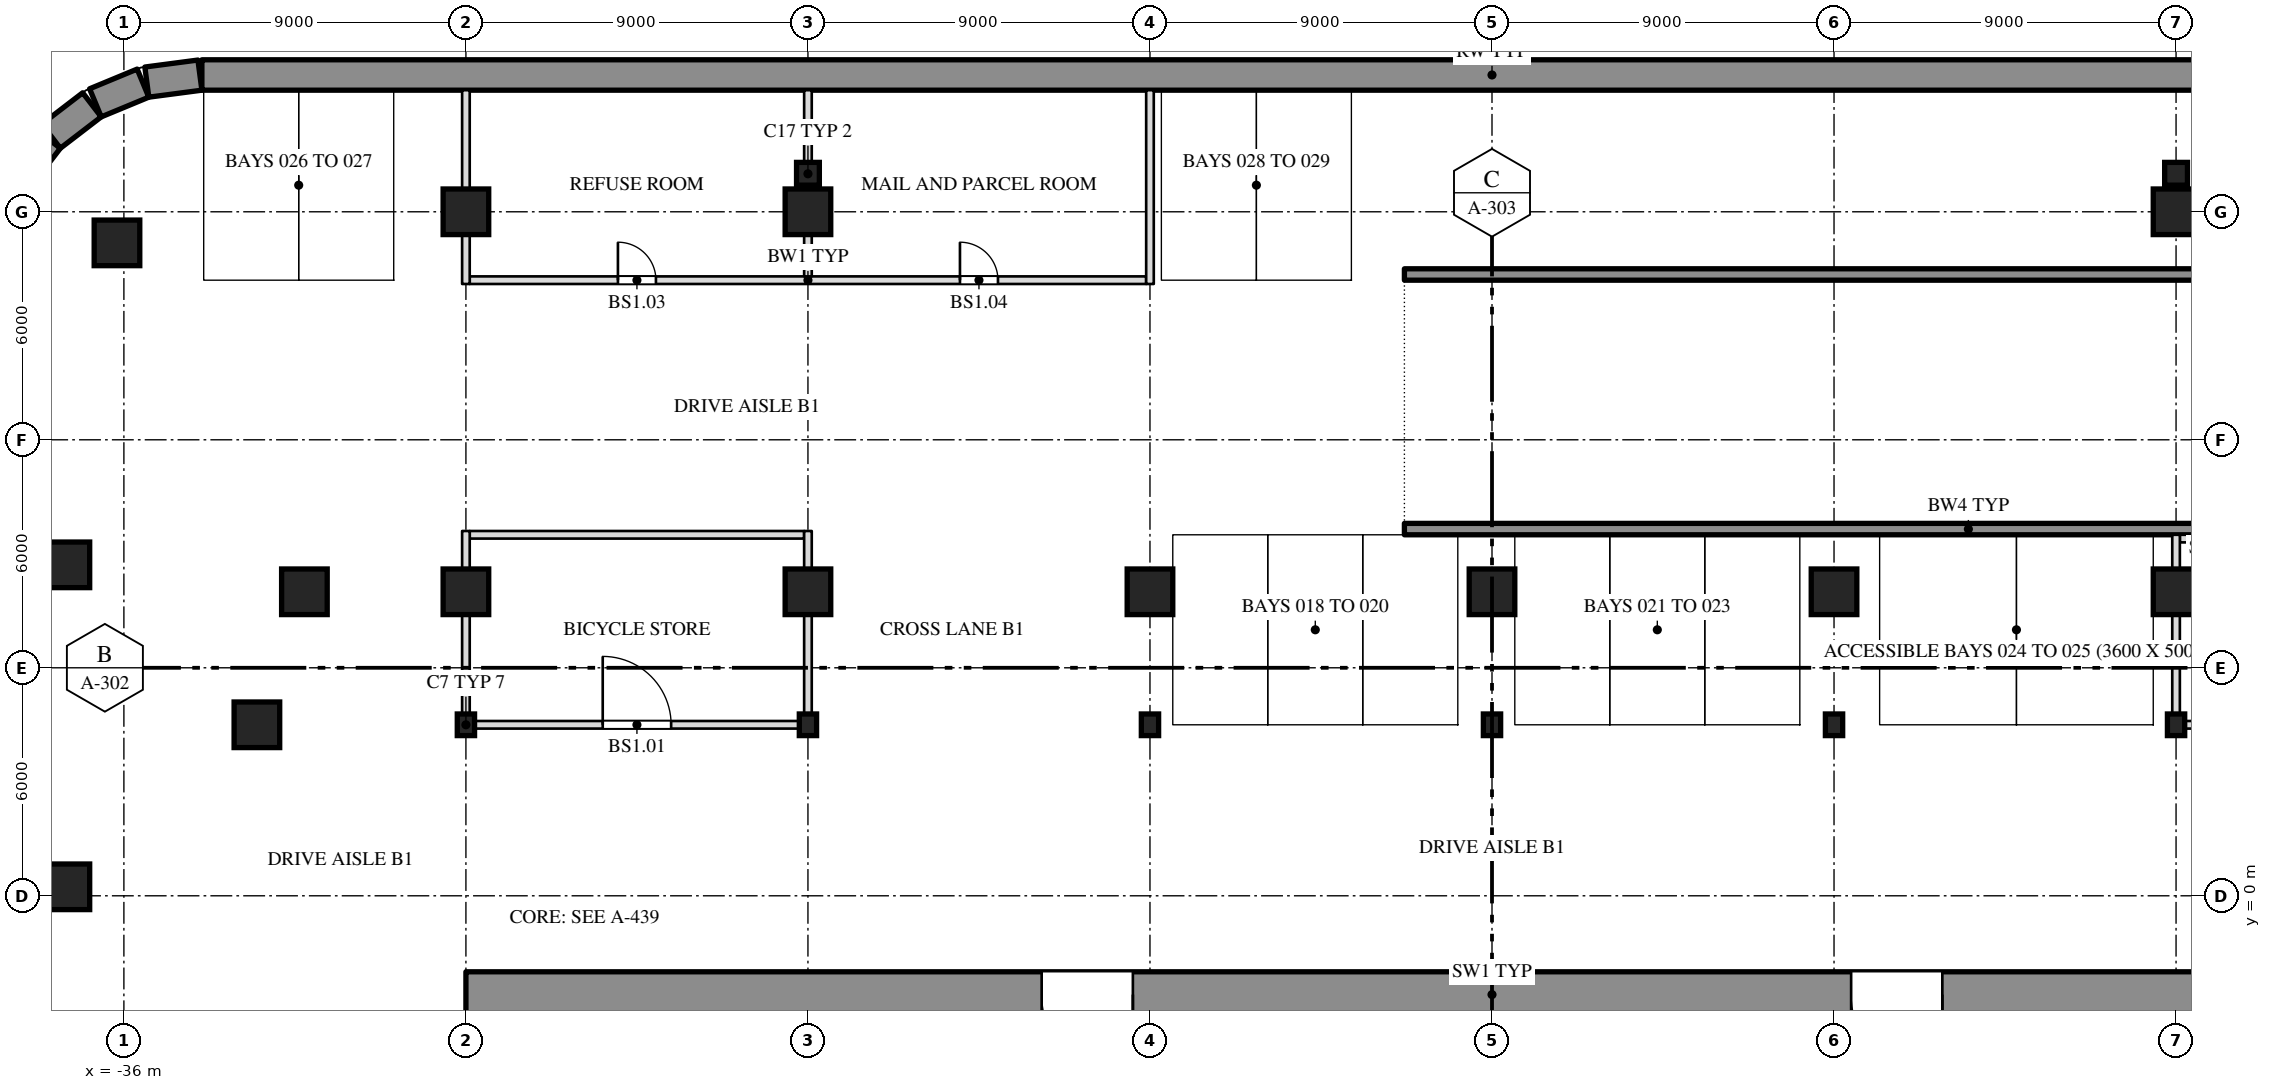
"""IFC4 building model, lengths in metres.
Left out: names, types, materials, properties, quantities, classifications, styles, units other than length and angle.
Written with IfcOpenShell. Run it as: python <this file> out.ifc"""

import sys

from ifc_helpers import new_model, si_unit, direction, frame, frame_2d, origin, origin_2d, place, context, subcontext, project, spatial, rectangle, i_section, extrude, element, fill, save


model = new_model("IFC4")
c1 = context("Model", 3, precision=1e-05, world=origin(), true_north=direction((0.0, 1.0)))
c2 = subcontext(c1, "Body", "Model", "MODEL_VIEW")
j1 = project(units=[si_unit("LENGTHUNIT", "METRE"), si_unit("PLANEANGLEUNIT", "RADIAN")], contexts=[c1])
p1 = place(None, origin())
s1 = spatial("IfcSite", under=j1, at=p1, CompositionType="ELEMENT")
p2 = place(p1, origin())
s2 = spatial("IfcBuilding", under=s1, at=p2, CompositionType="ELEMENT")
p3 = place(p2, frame((0.0, 0.0, -4.2)))
s3 = spatial("IfcBuildingStorey", under=s2, at=p3, CompositionType="ELEMENT", Elevation=-4.2)
for number, where, z_axis, x_axis in (
    (1, (-38.815, 18.84, 0.0), (0.0, 0.0, 1.0), (0.609, 0.793, 0.0)),
    (2, (-37.916, 19.99, 0.0), (0.0, 0.0, 1.0), (0.793, 0.609, 0.0)),
    (3, (-36.75, 20.867, 0.0), (0.0, 0.0, 1.0), (0.924, 0.383, 0.0)),
):
    element("IfcWall", number, at=place(p3, frame(where, z_axis=z_axis, x_axis=x_axis)), inside=s3, PredefinedType="SOLIDWALL", context=c2, shape_type="SweptSolid", body=[
        extrude(rectangle(XDim=1.355, YDim=0.8, at=frame_2d((0.678, 0.0))), origin(), (0.0, 0.0, 1.0), 4.2),
    ])
p4 = place(p3, frame((-35.396, 21.413, 0.0), z_axis=(0.0, 0.0, 1.0), x_axis=(0.99144603414, 0.130517283865, 0.0)))
e4 = element("IfcWall", 4, at=p4, inside=s3, PredefinedType="SOLIDWALL", context=c2, shape_type="SweptSolid", body=[
    extrude(rectangle(XDim=1.408, YDim=0.8, at=frame_2d((0.704, 0.0))), origin(), (0.0, 0.0, 1.0), 4.2),
])
p5 = place(p3, frame((-33.948, 21.6, 0.0), z_axis=(0.0, 0.0, 1.0), x_axis=(1.0, 0.0, 0.0)))
e5 = element("IfcWall", 5, at=p5, inside=s3, PredefinedType="SOLIDWALL", context=c2, shape_type="SweptSolid", body=[
    extrude(rectangle(XDim=67.895, YDim=0.8, at=frame_2d((33.948, 0.0))), origin(), (0.0, 0.0, 1.0), 4.2),
])
for number, where, z_axis, x_axis in (
    (6, (-37.5, 0.236, 0.0), (0.0, 0.0, 1.0), (1.0, 0.0, 0.0)),
    (7, (-32.5, 4.5, 0.0), (0.0, 0.0, 1.0), (1.0, 0.0, 0.0)),
):
    element("IfcColumn", number, at=place(p3, frame(where, z_axis=z_axis, x_axis=x_axis)), inside=s3, PredefinedType="COLUMN", context=c2, shape_type="SweptSolid", body=[
        extrude(rectangle(XDim=1.2, YDim=1.2, at=origin_2d()), origin(), (0.0, 0.0, 1.0), 4.2),
    ])
for number, where, z_axis, x_axis in (
    (8, (-27.0, 4.5, 0.0), (0.0, 0.0, 1.0), (1.0, 0.0, 0.0)),
    (9, (-18.0, 4.5, 0.0), (0.0, 0.0, 1.0), (1.0, 0.0, 0.0)),
    (10, (-9.0, 4.5, 0.0), (0.0, 0.0, 1.0), (1.0, 0.0, 0.0)),
    (11, (0.0, 4.5, 0.0), (0.0, 0.0, 1.0), (1.0, 0.0, 0.0)),
    (12, (9.0, 4.5, 0.0), (0.0, 0.0, 1.0), (1.0, 0.0, 0.0)),
    (13, (18.0, 4.5, 0.0), (0.0, 0.0, 1.0), (1.0, 0.0, 0.0)),
):
    element("IfcColumn", number, at=place(p3, frame(where, z_axis=z_axis, x_axis=x_axis)), inside=s3, PredefinedType="COLUMN", context=c2, shape_type="SweptSolid", body=[
        extrude(i_section(OverallWidth=0.455, OverallDepth=0.569, WebThickness=0.078, FlangeThickness=0.125, at=origin_2d()), origin(), (0.0, 0.0, 1.0), 4.2),
    ])
for number, where, z_axis, x_axis in (
    (14, (-31.25, 8.0, 0.0), (0.0, 0.0, 1.0), (1.0, 0.0, 0.0)),
    (15, (-27.0, 8.0, 0.0), (0.0, 0.0, 1.0), (1.0, 0.0, 0.0)),
    (16, (-18.0, 8.0, 0.0), (0.0, 0.0, 1.0), (1.0, 0.0, 0.0)),
    (17, (-9.0, 8.0, 0.0), (0.0, 0.0, 1.0), (1.0, 0.0, 0.0)),
    (18, (0.0, 8.0, 0.0), (0.0, 0.0, 1.0), (1.0, 0.0, 0.0)),
    (19, (9.0, 8.0, 0.0), (0.0, 0.0, 1.0), (1.0, 0.0, 0.0)),
    (20, (18.0, 8.0, 0.0), (0.0, 0.0, 1.0), (1.0, 0.0, 0.0)),
    (21, (-37.5, 8.709, 0.0), (0.0, 0.0, 1.0), (1.0, 0.0, 0.0)),
    (22, (-36.182, 17.182, 0.0), (0.0, 0.0, 1.0), (1.0, 0.0, 0.0)),
    (23, (-27.0, 18.0, 0.0), (0.0, 0.0, 1.0), (1.0, 0.0, 0.0)),
    (24, (-18.0, 18.0, 0.0), (0.0, 0.0, 1.0), (1.0, 0.0, 0.0)),
    (25, (18.0, 18.0, 0.0), (0.0, 0.0, 1.0), (1.0, 0.0, 0.0)),
):
    element("IfcColumn", number, at=place(p3, frame(where, z_axis=z_axis, x_axis=x_axis)), inside=s3, PredefinedType="COLUMN", context=c2, shape_type="SweptSolid", body=[
        extrude(rectangle(XDim=1.2, YDim=1.2, at=origin_2d()), origin(), (0.0, 0.0, 1.0), 4.2),
    ])
for number, where, z_axis, x_axis in (
    (26, (-18.0, 19.0, 0.0), (0.0, 0.0, 1.0), (1.0, 0.0, 0.0)),
    (27, (18.0, 19.0, 0.0), (0.0, 0.0, 1.0), (1.0, 0.0, 0.0)),
):
    element("IfcColumn", number, at=place(p3, frame(where, z_axis=z_axis, x_axis=x_axis)), inside=s3, PredefinedType="COLUMN", context=c2, shape_type="SweptSolid", body=[
        extrude(rectangle(XDim=0.6, YDim=0.6, at=origin_2d()), origin(), (0.0, 0.0, 1.0), 4.2),
    ])
p6 = place(p3, frame((-27.0, -2.6, 0.0), z_axis=(0.0, 0.0, 1.0), x_axis=(1.0, 0.0, 0.0)))
e28 = element("IfcWall", 28, at=p6, inside=s3, PredefinedType="SHEAR", context=c2, shape_type="SweptSolid", body=[
    extrude(rectangle(XDim=54.0, YDim=1.2, at=frame_2d((27.0, 0.0))), origin(), (0.0, 0.0, 1.0), 3.9),
])
p7 = place(p6, frame((15.15, 0.0, 0.0)))
e29 = element("IfcOpeningElement", 29, at=p7, cuts=e28, PredefinedType="OPENING", context=c2, shape_type="SweptSolid", body=[
    extrude(rectangle(XDim=2.4, YDim=2.1, at=frame_2d((1.2, 1.05))), frame((0.0, 0.612, 0.0), z_axis=(0.0, -1.0, 0.0), x_axis=(1.0, 0.0, 0.0)), (0.0, 0.0, 1.0), 1.224),
])
p8 = place(p6, frame((36.45, 0.0, 0.0)))
e30 = element("IfcOpeningElement", 30, at=p8, cuts=e28, PredefinedType="OPENING", context=c2, shape_type="SweptSolid", body=[
    extrude(rectangle(XDim=2.4, YDim=2.1, at=frame_2d((1.2, 1.05))), frame((0.0, 0.612, 0.0), z_axis=(0.0, -1.0, 0.0), x_axis=(1.0, 0.0, 0.0)), (0.0, 0.0, 1.0), 1.224),
])
p9 = place(p3, frame((-26.773, 4.5, 0.0), z_axis=(0.0, 0.0, 1.0), x_axis=(1.0, 0.0, 0.0)))
e31 = element("IfcWall", 31, at=p9, inside=s3, PredefinedType="PARTITIONING", context=c2, shape_type="SweptSolid", body=[
    extrude(rectangle(XDim=8.545, YDim=0.2, at=frame_2d((4.273, 0.0))), origin(), (0.0, 0.0, 1.0), 3.288),
])
p10 = place(p9, frame((3.373, 0.0, 0.0)))
e32 = element("IfcOpeningElement", 32, at=p10, cuts=e31, PredefinedType="OPENING", context=c2, shape_type="SweptSolid", body=[
    extrude(rectangle(XDim=1.8, YDim=2.1, at=frame_2d((0.9, 1.05))), frame((0.0, 0.112, 0.0), z_axis=(0.0, -1.0, 0.0), x_axis=(1.0, 0.0, 0.0)), (0.0, 0.0, 1.0), 0.224),
])
p11 = place(p3, frame((18.227, 4.5, 0.0), z_axis=(0.0, 0.0, 1.0), x_axis=(1.0, 0.0, 0.0)))
e33 = element("IfcWall", 33, at=p11, inside=s3, PredefinedType="PARTITIONING", context=c2, shape_type="SweptSolid", body=[
    extrude(rectangle(XDim=8.545, YDim=0.2, at=frame_2d((4.273, 0.0))), origin(), (0.0, 0.0, 1.0), 3.288),
])
p12 = place(p11, frame((3.773, 0.0, 0.0)))
e34 = element("IfcOpeningElement", 34, at=p12, cuts=e33, PredefinedType="OPENING", context=c2, shape_type="SweptSolid", body=[
    extrude(rectangle(XDim=1.0, YDim=2.1, at=frame_2d((0.5, 1.05))), frame((0.0, 0.112, 0.0), z_axis=(0.0, -1.0, 0.0), x_axis=(1.0, 0.0, 0.0)), (0.0, 0.0, 1.0), 0.224),
])
for number, where, z_axis, x_axis in (
    (35, (18.1, 9.4, 0.0), (0.0, 0.0, 1.0), (1.0, 0.0, 0.0)),
    (36, (-26.9, 9.5, 0.0), (0.0, 0.0, 1.0), (1.0, 0.0, 0.0)),
):
    element("IfcWall", number, at=place(p3, frame(where, z_axis=z_axis, x_axis=x_axis)), inside=s3, PredefinedType="PARTITIONING", context=c2, shape_type="SweptSolid", body=[
        extrude(rectangle(XDim=8.8, YDim=0.2, at=frame_2d((4.4, 0.0))), origin(), (0.0, 0.0, 1.0), 3.288),
    ])
p13 = place(p3, frame((-26.9, 16.2, 0.0), z_axis=(0.0, 0.0, 1.0), x_axis=(1.0, 0.0, 0.0)))
e37 = element("IfcWall", 37, at=p13, inside=s3, PredefinedType="PARTITIONING", context=c2, shape_type="SweptSolid", body=[
    extrude(rectangle(XDim=17.8, YDim=0.2, at=frame_2d((8.9, 0.0))), origin(), (0.0, 0.0, 1.0), 3.288),
])
p14 = place(p13, frame((3.9, 0.0, 0.0)))
e38 = element("IfcOpeningElement", 38, at=p14, cuts=e37, PredefinedType="OPENING", context=c2, shape_type="SweptSolid", body=[
    extrude(rectangle(XDim=1.0, YDim=2.1, at=frame_2d((0.5, 1.05))), frame((0.0, 0.112, 0.0), z_axis=(0.0, -1.0, 0.0), x_axis=(1.0, 0.0, 0.0)), (0.0, 0.0, 1.0), 0.224),
])
p15 = place(p13, frame((12.9, 0.0, 0.0)))
e39 = element("IfcOpeningElement", 39, at=p15, cuts=e37, PredefinedType="OPENING", context=c2, shape_type="SweptSolid", body=[
    extrude(rectangle(XDim=1.0, YDim=2.1, at=frame_2d((0.5, 1.05))), frame((0.0, 0.112, 0.0), z_axis=(0.0, -1.0, 0.0), x_axis=(1.0, 0.0, 0.0)), (0.0, 0.0, 1.0), 0.224),
])
p16 = place(p3, frame((-27.0, 4.784, 0.0), z_axis=(0.0, 0.0, 1.0), x_axis=(0.0, 1.0, 0.0)))
e40 = element("IfcWall", 40, at=p16, inside=s3, PredefinedType="PARTITIONING", context=c2, shape_type="SweptSolid", body=[
    extrude(rectangle(XDim=2.615, YDim=0.2, at=frame_2d((1.308, 0.0))), origin(), (0.0, 0.0, 1.0), 3.288),
])
p17 = place(p3, frame((-27.0, 8.6, 0.0), z_axis=(0.0, 0.0, 1.0), x_axis=(0.0, 1.0, 0.0)))
e41 = element("IfcWall", 41, at=p17, inside=s3, PredefinedType="PARTITIONING", context=c2, shape_type="SweptSolid", body=[
    extrude(rectangle(XDim=1.0, YDim=0.2, at=frame_2d((0.5, 0.0))), origin(), (0.0, 0.0, 1.0), 3.288),
])
p18 = place(p3, frame((-27.0, 16.1, 0.0), z_axis=(0.0, 0.0, 1.0), x_axis=(0.0, 1.0, 0.0)))
e42 = element("IfcWall", 42, at=p18, inside=s3, PredefinedType="PARTITIONING", context=c2, shape_type="SweptSolid", body=[
    extrude(rectangle(XDim=1.3, YDim=0.2, at=frame_2d((0.65, 0.0))), origin(), (0.0, 0.0, 1.0), 3.288),
])
p19 = place(p3, frame((-27.0, 18.6, 0.0), z_axis=(0.0, 0.0, 1.0), x_axis=(0.0, 1.0, 0.0)))
e43 = element("IfcWall", 43, at=p19, inside=s3, PredefinedType="PARTITIONING", context=c2, shape_type="SweptSolid", body=[
    extrude(rectangle(XDim=2.6, YDim=0.2, at=frame_2d((1.3, 0.0))), origin(), (0.0, 0.0, 1.0), 3.9),
])
p20 = place(p3, frame((-18.0, 4.784, 0.0), z_axis=(0.0, 0.0, 1.0), x_axis=(0.0, 1.0, 0.0)))
e44 = element("IfcWall", 44, at=p20, inside=s3, PredefinedType="PARTITIONING", context=c2, shape_type="SweptSolid", body=[
    extrude(rectangle(XDim=2.615, YDim=0.2, at=frame_2d((1.308, 0.0))), origin(), (0.0, 0.0, 1.0), 3.288),
])
p21 = place(p3, frame((-18.0, 8.6, 0.0), z_axis=(0.0, 0.0, 1.0), x_axis=(0.0, 1.0, 0.0)))
e45 = element("IfcWall", 45, at=p21, inside=s3, PredefinedType="PARTITIONING", context=c2, shape_type="SweptSolid", body=[
    extrude(rectangle(XDim=1.0, YDim=0.2, at=frame_2d((0.5, 0.0))), origin(), (0.0, 0.0, 1.0), 3.288),
])
p22 = place(p3, frame((-18.0, 16.3, 0.0), z_axis=(0.0, 0.0, 1.0), x_axis=(0.0, 1.0, 0.0)))
e46 = element("IfcWall", 46, at=p22, inside=s3, PredefinedType="PARTITIONING", context=c2, shape_type="SweptSolid", body=[
    extrude(rectangle(XDim=1.1, YDim=0.2, at=frame_2d((0.55, 0.0))), origin(), (0.0, 0.0, 1.0), 3.288),
])
p23 = place(p3, frame((-18.0, 19.3, 0.0), z_axis=(0.0, 0.0, 1.0), x_axis=(0.0, 1.0, 0.0)))
e47 = element("IfcWall", 47, at=p23, inside=s3, PredefinedType="PARTITIONING", context=c2, shape_type="SweptSolid", body=[
    extrude(rectangle(XDim=1.9, YDim=0.2, at=frame_2d((0.95, 0.0))), origin(), (0.0, 0.0, 1.0), 3.9),
])
p24 = place(p3, frame((-9.0, 16.1, 0.0), z_axis=(0.0, 0.0, 1.0), x_axis=(0.0, 1.0, 0.0)))
e48 = element("IfcWall", 48, at=p24, inside=s3, PredefinedType="PARTITIONING", context=c2, shape_type="SweptSolid", body=[
    extrude(rectangle(XDim=5.1, YDim=0.2, at=frame_2d((2.55, 0.0))), origin(), (0.0, 0.0, 1.0), 3.9),
])
p25 = place(p3, frame((18.0, 4.784, 0.0), z_axis=(0.0, 0.0, 1.0), x_axis=(0.0, 1.0, 0.0)))
e49 = element("IfcWall", 49, at=p25, inside=s3, PredefinedType="PARTITIONING", context=c2, shape_type="SweptSolid", body=[
    extrude(rectangle(XDim=2.615, YDim=0.2, at=frame_2d((1.308, 0.0))), origin(), (0.0, 0.0, 1.0), 3.288),
])
p26 = place(p3, frame((18.0, 8.6, 0.0), z_axis=(0.0, 0.0, 1.0), x_axis=(0.0, 1.0, 0.0)))
e50 = element("IfcWall", 50, at=p26, inside=s3, PredefinedType="PARTITIONING", context=c2, shape_type="SweptSolid", body=[
    extrude(rectangle(XDim=0.9, YDim=0.2, at=frame_2d((0.45, 0.0))), origin(), (0.0, 0.0, 1.0), 3.288),
])
p27 = place(p3, frame((-2.305, 9.65, 0.0), z_axis=(0.0, 0.0, 1.0), x_axis=(1.0, 0.0, 0.0)))
e51 = element("IfcWall", 51, at=p27, inside=s3, PredefinedType="SOLIDWALL", context=c2, shape_type="SweptSolid", body=[
    extrude(rectangle(XDim=29.68, YDim=0.3, at=frame_2d((14.84, 0.0))), origin(), (0.0, 0.0, 1.0), 1.1),
])
p28 = place(p3, frame((-2.305, 16.35, 0.0), z_axis=(0.0, 0.0, 1.0), x_axis=(1.0, 0.0, 0.0)))
e52 = element("IfcWall", 52, at=p28, inside=s3, PredefinedType="SOLIDWALL", context=c2, shape_type="SweptSolid", body=[
    extrude(rectangle(XDim=29.505, YDim=0.3, at=frame_2d((14.752, 0.0))), origin(), (0.0, 0.0, 1.0), 1.1),
])
p29 = place(p10, origin())
e53 = element("IfcDoor", 53, at=p29, inside=s3, OperationType="DOUBLE_DOOR_SINGLE_SWING", PredefinedType="DOOR", context=c2, shape_type="SweptSolid", body=[
    extrude(rectangle(XDim=1.8, YDim=2.1, at=frame_2d((0.9, 1.05))), frame((0.0, 0.025, 0.0), z_axis=(0.0, -1.0, 0.0), x_axis=(1.0, 0.0, 0.0)), (0.0, 0.0, 1.0), 0.05),
])
fill(e32, e53)
p30 = place(p14, origin())
e54 = element("IfcDoor", 54, at=p30, inside=s3, OperationType="SINGLE_SWING_LEFT", PredefinedType="DOOR", context=c2, shape_type="SweptSolid", body=[
    extrude(rectangle(XDim=1.0, YDim=2.1, at=frame_2d((0.5, 1.05))), frame((0.0, 0.025, 0.0), z_axis=(0.0, -1.0, 0.0), x_axis=(1.0, 0.0, 0.0)), (0.0, 0.0, 1.0), 0.05),
])
fill(e38, e54)
p31 = place(p15, origin())
e55 = element("IfcDoor", 55, at=p31, inside=s3, OperationType="SINGLE_SWING_LEFT", PredefinedType="DOOR", context=c2, shape_type="SweptSolid", body=[
    extrude(rectangle(XDim=1.0, YDim=2.1, at=frame_2d((0.5, 1.05))), frame((0.0, 0.025, 0.0), z_axis=(0.0, -1.0, 0.0), x_axis=(1.0, 0.0, 0.0)), (0.0, 0.0, 1.0), 0.05),
])
fill(e39, e55)
p32 = place(p7, origin())
e56 = element("IfcDoor", 56, at=p32, inside=s3, OperationType="DOUBLE_DOOR_SINGLE_SWING", PredefinedType="DOOR", context=c2, shape_type="SweptSolid", body=[
    extrude(rectangle(XDim=2.4, YDim=2.1, at=frame_2d((1.2, 1.05))), frame((0.0, 0.025, 0.0), z_axis=(0.0, -1.0, 0.0), x_axis=(1.0, 0.0, 0.0)), (0.0, 0.0, 1.0), 0.05),
])
fill(e29, e56)
p33 = place(p8, origin())
e57 = element("IfcDoor", 57, at=p33, inside=s3, OperationType="DOUBLE_DOOR_SINGLE_SWING", PredefinedType="DOOR", context=c2, shape_type="SweptSolid", body=[
    extrude(rectangle(XDim=2.4, YDim=2.1, at=frame_2d((1.2, 1.05))), frame((0.0, 0.025, 0.0), z_axis=(0.0, -1.0, 0.0), x_axis=(1.0, 0.0, 0.0)), (0.0, 0.0, 1.0), 0.05),
])
fill(e30, e57)
save(model, sys.argv[1])
